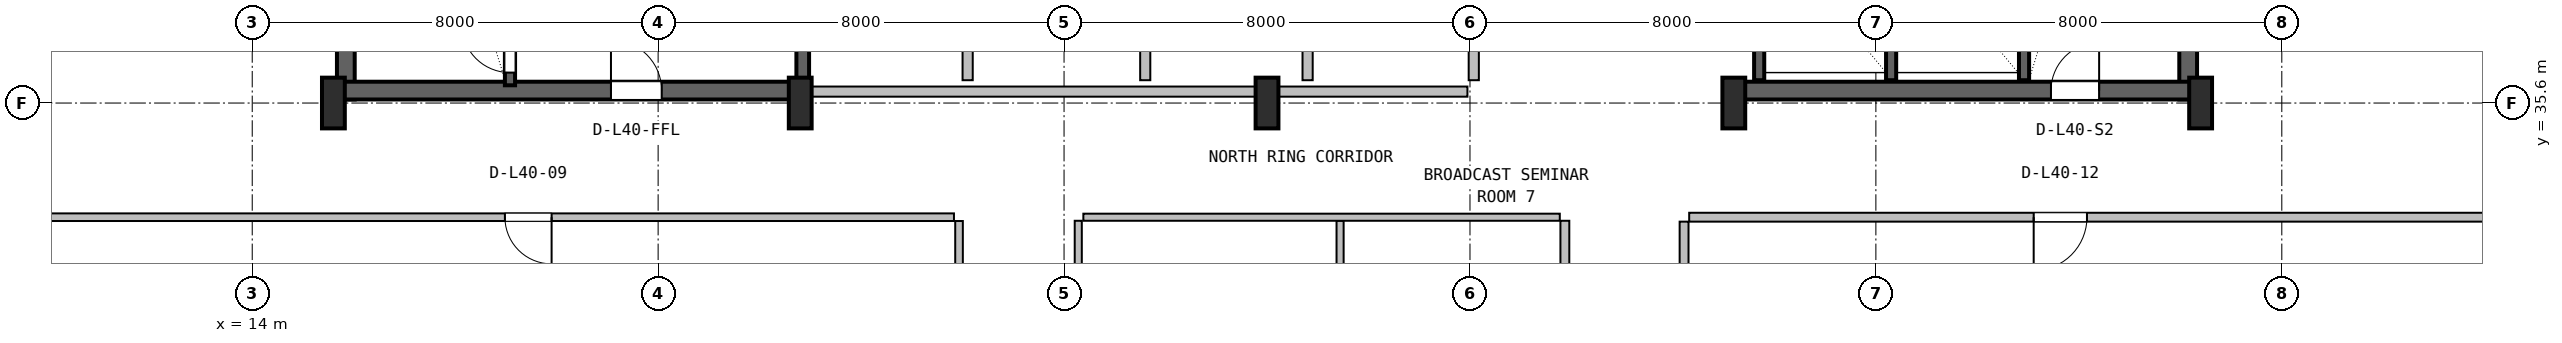
"""IFC4 building model, lengths in metres.
Left out: names, types, materials, properties, quantities, classifications, styles, units other than length and angle.
Written with IfcOpenShell. Run it as: python <this file> out.ifc"""

import sys

from ifc_helpers import new_model, si_unit, direction, frame, frame_2d, origin, origin_2d, place, context, subcontext, project, spatial, rectangle, i_section, extrude, source, transform, mapped, element, fill, save


model = new_model("IFC4")
c1 = context("Model", 3, precision=1e-05, world=origin(), true_north=direction((0.0, 1.0)))
c2 = subcontext(c1, "Body", "Model", "MODEL_VIEW")
j1 = project(units=[si_unit("LENGTHUNIT", "METRE"), si_unit("PLANEANGLEUNIT", "RADIAN")], contexts=[c1])
p1 = place(None, origin())
s1 = spatial("IfcSite", under=j1, at=p1, CompositionType="ELEMENT")
p2 = place(p1, origin())
s2 = spatial("IfcBuilding", under=s1, at=p2, CompositionType="ELEMENT")
p3 = place(p2, frame((0.0, 0.0, 164.8)))
s3 = spatial("IfcBuildingStorey", under=s2, at=p3, CompositionType="ELEMENT", Elevation=164.8)
for number, where, z_axis, x_axis in (
    (1, (15.845, 35.67, 0.0), (0.0, 0.0, 1.0), (0.0, 1.0, 0.0)),
    (2, (52.155, 35.67, 0.0), (0.0, 0.0, 1.0), (0.0, 1.0, 0.0)),
):
    element("IfcWall", number, at=place(p3, frame(where, z_axis=z_axis, x_axis=x_axis)), inside=s3, PredefinedType="SHEAR", context=c2, shape_type="SweptSolid", body=[
        extrude(rectangle(XDim=11.13, YDim=0.35, at=frame_2d((5.565, 0.0))), origin(), (0.0, 0.0, 1.0), 3.55),
    ])
p4 = place(p3, frame((15.67, 35.845, 0.0), z_axis=(0.0, 0.0, 1.0), x_axis=(1.0, 0.0, 0.0)))
e3 = element("IfcWall", 3, at=p4, inside=s3, PredefinedType="SHEAR", context=c2, shape_type="SweptSolid", body=[
    extrude(rectangle(XDim=9.13, YDim=0.35, at=frame_2d((4.565, 0.0))), origin(), (0.0, 0.0, 1.0), 3.55),
])
p5 = place(p4, frame((5.4, 0.0, 0.0)))
e4 = element("IfcOpeningElement", 4, at=p5, cuts=e3, PredefinedType="OPENING", context=c2, shape_type="SweptSolid", body=[
    extrude(rectangle(XDim=1.0, YDim=2.1, at=frame_2d((0.5, 1.05))), frame((0.0, 0.185, 0.0), z_axis=(0.0, -1.0, 0.0), x_axis=(1.0, 0.0, 0.0)), (0.0, 0.0, 1.0), 0.37),
])
p6 = place(p3, frame((43.2, 35.845, 0.0), z_axis=(0.0, 0.0, 1.0), x_axis=(1.0, 0.0, 0.0)))
e5 = element("IfcWall", 5, at=p6, inside=s3, PredefinedType="SHEAR", context=c2, shape_type="SweptSolid", body=[
    extrude(rectangle(XDim=9.13, YDim=0.35, at=frame_2d((4.565, 0.0))), origin(), (0.0, 0.0, 1.0), 3.55),
])
p7 = place(p6, frame((6.25, 0.0, 0.0)))
e6 = element("IfcOpeningElement", 6, at=p7, cuts=e5, PredefinedType="OPENING", context=c2, shape_type="SweptSolid", body=[
    extrude(rectangle(XDim=0.95, YDim=2.1, at=frame_2d((0.475, 1.05))), frame((0.0, 0.185, 0.0), z_axis=(0.0, -1.0, 0.0), x_axis=(1.0, 0.0, 0.0)), (0.0, 0.0, 1.0), 0.37),
])
m1 = source(origin(), c2, "Body", "SweptSolid", [
    extrude(i_section(OverallWidth=0.45, OverallDepth=1.0, WebThickness=0.016, FlangeThickness=0.03, FilletRadius=0.016, at=origin_2d()), origin(), (0.0, 0.0, 1.0), 3.8),
])
for number, where, z_axis, x_axis in (
    (7, (15.6, 35.6, 0.0), (0.0, 0.0, 1.0), (1.0, 0.0, 0.0)),
    (8, (24.8, 35.6, 0.0), (0.0, 0.0, 1.0), (1.0, 0.0, 0.0)),
    (9, (34.0, 35.6, 0.0), (0.0, 0.0, 1.0), (1.0, 0.0, 0.0)),
    (10, (43.2, 35.6, 0.0), (0.0, 0.0, 1.0), (1.0, 0.0, 0.0)),
    (11, (52.4, 35.6, 0.0), (0.0, 0.0, 1.0), (1.0, 0.0, 0.0)),
):
    element("IfcColumn", number, at=place(p3, frame(where, z_axis=z_axis, x_axis=x_axis)), inside=s3, PredefinedType="COLUMN", context=c2, shape_type="MappedRepresentation", body=[
        mapped(m1, transform((0.0, 0.0, 0.0), x_axis=(1.0, 0.0, 0.0), y_axis=(0.0, 1.0, 0.0), z_axis=(0.0, 0.0, 1.0), scale=1.0)),
    ])
p8 = place(p3, frame((19.08, 35.95, 0.0), z_axis=(0.0, 0.0, 1.0), x_axis=(0.0, 1.0, 0.0)))
e12 = element("IfcWall", 12, at=p8, inside=s3, PredefinedType="SHEAR", context=c2, shape_type="SweptSolid", body=[
    extrude(rectangle(XDim=9.65, YDim=0.2, at=frame_2d((4.825, 0.0))), origin(), (0.0, 0.0, 1.0), 3.55),
])
p9 = place(p8, frame((0.25, 0.0, 0.0)))
e13 = element("IfcOpeningElement", 13, at=p9, cuts=e12, PredefinedType="OPENING", context=c2, shape_type="SweptSolid", body=[
    extrude(rectangle(XDim=0.95, YDim=2.1, at=frame_2d((0.475, 1.05))), frame((0.0, 0.11, 0.0), z_axis=(0.0, -1.0, 0.0), x_axis=(1.0, 0.0, 0.0)), (0.0, 0.0, 1.0), 0.22),
])
p10 = place(p3, frame((24.85, 36.05, 0.0), z_axis=(0.0, 0.0, 1.0), x_axis=(0.0, 1.0, 0.0)))
e14 = element("IfcWall", 14, at=p10, inside=s3, PredefinedType="SHEAR", context=c2, shape_type="SweptSolid", body=[
    extrude(rectangle(XDim=10.45, YDim=0.25, at=frame_2d((5.225, 0.0))), origin(), (0.0, 0.0, 1.0), 3.55),
])
p11 = place(p3, frame((48.92, 36.05, 0.0), z_axis=(0.0, 0.0, 1.0), x_axis=(0.0, 1.0, 0.0)))
e15 = element("IfcWall", 15, at=p11, inside=s3, PredefinedType="SHEAR", context=c2, shape_type="SweptSolid", body=[
    extrude(rectangle(XDim=10.5, YDim=0.2, at=frame_2d((5.25, 0.0))), origin(), (0.0, 0.0, 1.0), 3.55),
])
for number, where, z_axis, x_axis in (
    (16, (43.7, 36.05, 0.0), (0.0, 0.0, 1.0), (0.0, 1.0, 0.0)),
    (17, (46.3, 36.05, 0.0), (0.0, 0.0, 1.0), (0.0, 1.0, 0.0)),
):
    element("IfcWall", number, at=place(p3, frame(where, z_axis=z_axis, x_axis=x_axis)), inside=s3, PredefinedType="SHEAR", context=c2, shape_type="SweptSolid", body=[
        extrude(rectangle(XDim=3.05, YDim=0.2, at=frame_2d((1.525, 0.0))), origin(), (0.0, 0.0, 1.0), 3.55),
    ])
p12 = place(p3, frame((25.0, 35.825, 0.0), z_axis=(0.0, 0.0, 1.0), x_axis=(1.0, 0.0, 0.0)))
e18 = element("IfcWall", 18, at=p12, inside=s3, PredefinedType="SOLIDWALL", context=c2, shape_type="SweptSolid", body=[
    extrude(rectangle(XDim=12.95, YDim=0.2, at=frame_2d((6.475, 0.0))), origin(), (0.0, 0.0, 1.0), 2.575),
])
for number, where, z_axis, x_axis in (
    (19, (28.1, 36.05, 0.0), (0.0, 0.0, 1.0), (0.0, 1.0, 0.0)),
    (20, (31.6, 36.05, 0.0), (0.0, 0.0, 1.0), (0.0, 1.0, 0.0)),
):
    element("IfcWall", number, at=place(p3, frame(where, z_axis=z_axis, x_axis=x_axis)), inside=s3, PredefinedType="PLUMBINGWALL", context=c2, shape_type="SweptSolid", body=[
        extrude(rectangle(XDim=3.1, YDim=0.2, at=frame_2d((1.55, 0.0))), origin(), (0.0, 0.0, 1.0), 3.53),
    ])
for number, where, z_axis, x_axis in (
    (21, (34.8, 36.05, 0.0), (0.0, 0.0, 1.0), (0.0, 1.0, 0.0)),
    (22, (38.075, 36.05, 0.0), (0.0, 0.0, 1.0), (0.0, 1.0, 0.0)),
):
    element("IfcWall", number, at=place(p3, frame(where, z_axis=z_axis, x_axis=x_axis)), inside=s3, PredefinedType="SOLIDWALL", context=c2, shape_type="SweptSolid", body=[
        extrude(rectangle(XDim=3.1, YDim=0.2, at=frame_2d((1.55, 0.0))), origin(), (0.0, 0.0, 1.0), 3.53),
    ])
p13 = place(p3, frame((27.93, 26.647, 0.0), z_axis=(0.0, 0.0, 1.0), x_axis=(0.0, 1.0, 0.0)))
e23 = element("IfcWall", 23, at=p13, inside=s3, PredefinedType="PARTITIONING", context=c2, shape_type="SweptSolid", body=[
    extrude(rectangle(XDim=6.628, YDim=0.15, at=frame_2d((3.314, 0.0))), origin(), (0.0, 0.0, 1.0), 3.222),
])
p14 = place(p3, frame((7.18, 33.35, 0.0), z_axis=(0.0, 0.0, 1.0), x_axis=(1.0, 0.0, 0.0)))
e24 = element("IfcWall", 24, at=p14, inside=s3, PredefinedType="PARTITIONING", context=c2, shape_type="SweptSolid", body=[
    extrude(rectangle(XDim=20.65, YDim=0.15, at=frame_2d((10.325, 0.0))), origin(), (0.0, 0.0, 1.0), 2.909),
])
p15 = place(p14, frame((11.8, 0.0, 0.0)))
e25 = element("IfcOpeningElement", 25, at=p15, cuts=e24, PredefinedType="OPENING", context=c2, shape_type="SweptSolid", body=[
    extrude(rectangle(XDim=0.92, YDim=2.08, at=frame_2d((0.46, 1.04))), frame((0.0, 0.085, 0.0), z_axis=(0.0, -1.0, 0.0), x_axis=(1.0, 0.0, 0.0)), (0.0, 0.0, 1.0), 0.17),
])
p16 = place(p3, frame((35.44, 28.98, 0.0), z_axis=(0.0, 0.0, 1.0), x_axis=(0.0, 1.0, 0.0)))
e26 = element("IfcWall", 26, at=p16, inside=s3, PredefinedType="PARTITIONING", context=c2, shape_type="SweptSolid", body=[
    extrude(rectangle(XDim=4.3, YDim=0.14, at=frame_2d((2.15, 0.0))), origin(), (0.0, 0.0, 1.0), 3.222),
])
p17 = place(p3, frame((30.38, 33.35, 0.0), z_axis=(0.0, 0.0, 1.0), x_axis=(1.0, 0.0, 0.0)))
e27 = element("IfcWall", 27, at=p17, inside=s3, PredefinedType="PARTITIONING", context=c2, shape_type="SweptSolid", body=[
    extrude(rectangle(XDim=9.39, YDim=0.14, at=frame_2d((4.695, 0.0))), origin(), (0.0, 0.0, 1.0), 2.909),
])
p18 = place(p3, frame((30.28, 28.98, 0.0), z_axis=(0.0, 0.0, 1.0), x_axis=(0.0, 1.0, 0.0)))
e28 = element("IfcWall", 28, at=p18, inside=s3, PredefinedType="PARTITIONING", context=c2, shape_type="SweptSolid", body=[
    extrude(rectangle(XDim=4.3, YDim=0.14, at=frame_2d((2.15, 0.0))), origin(), (0.0, 0.0, 1.0), 3.222),
])
p19 = place(p3, frame((39.87, 28.98, 0.0), z_axis=(0.0, 0.0, 1.0), x_axis=(0.0, 1.0, 0.0)))
e29 = element("IfcWall", 29, at=p19, inside=s3, PredefinedType="PARTITIONING", context=c2, shape_type="SweptSolid", body=[
    extrude(rectangle(XDim=4.3, YDim=0.175, at=frame_2d((2.15, 0.0))), origin(), (0.0, 0.0, 1.0), 3.222),
])
p20 = place(p19, frame((1.625, 0.0, 0.0)))
e30 = element("IfcOpeningElement", 30, at=p20, cuts=e29, PredefinedType="OPENING", context=c2, shape_type="SweptSolid", body=[
    extrude(rectangle(XDim=1.05, YDim=2.1, at=frame_2d((0.525, 1.05))), frame((0.0, 0.098, 0.0), z_axis=(0.0, -1.0, 0.0), x_axis=(1.0, 0.0, 0.0)), (0.0, 0.0, 1.0), 0.195),
])
p21 = place(p3, frame((42.32, 33.35, 0.0), z_axis=(0.0, 0.0, 1.0), x_axis=(1.0, 0.0, 0.0)))
e31 = element("IfcWall", 31, at=p21, inside=s3, PredefinedType="PARTITIONING", context=c2, shape_type="SweptSolid", body=[
    extrude(rectangle(XDim=18.5, YDim=0.175, at=frame_2d((9.25, 0.0))), origin(), (0.0, 0.0, 1.0), 2.909),
])
p22 = place(p21, frame((6.79, 0.0, 0.0)))
e32 = element("IfcOpeningElement", 32, at=p22, cuts=e31, PredefinedType="OPENING", context=c2, shape_type="SweptSolid", body=[
    extrude(rectangle(XDim=1.05, YDim=2.1, at=frame_2d((0.525, 1.05))), frame((0.0, 0.098, 0.0), z_axis=(0.0, -1.0, 0.0), x_axis=(1.0, 0.0, 0.0)), (0.0, 0.0, 1.0), 0.195),
])
p23 = place(p3, frame((42.22, 26.647, 0.0), z_axis=(0.0, 0.0, 1.0), x_axis=(0.0, 1.0, 0.0)))
e33 = element("IfcWall", 33, at=p23, inside=s3, PredefinedType="PARTITIONING", context=c2, shape_type="SweptSolid", body=[
    extrude(rectangle(XDim=6.616, YDim=0.175, at=frame_2d((3.308, 0.0))), origin(), (0.0, 0.0, 1.0), 3.222),
])
m2 = source(origin(), c2, "Body", "SweptSolid", [
    extrude(rectangle(XDim=0.95, YDim=2.1, at=frame_2d((0.475, 1.05))), frame((0.0, 0.025, 0.0), z_axis=(0.0, -1.0, 0.0), x_axis=(1.0, 0.0, 0.0)), (0.0, 0.0, 1.0), 0.05),
])
p24 = place(p9, origin())
e34 = element("IfcDoor", 34, at=p24, inside=s3, OperationType="SINGLE_SWING_RIGHT", PredefinedType="DOOR", context=c2, shape_type="MappedRepresentation", body=[
    mapped(m2, transform((0.0, 0.0, 0.0), x_axis=(1.0, 0.0, 0.0), y_axis=(0.0, 1.0, 0.0), z_axis=(0.0, 0.0, 1.0), scale=1.0)),
])
fill(e13, e34)
m3 = source(origin(), c2, "Body", "SweptSolid", [
    extrude(rectangle(XDim=1.0, YDim=2.1, at=frame_2d((0.5, 1.05))), frame((0.0, 0.025, 0.0), z_axis=(0.0, -1.0, 0.0), x_axis=(1.0, 0.0, 0.0)), (0.0, 0.0, 1.0), 0.05),
])
p25 = place(p5, origin())
e35 = element("IfcDoor", 35, at=p25, inside=s3, OperationType="SINGLE_SWING_LEFT", PredefinedType="DOOR", context=c2, shape_type="MappedRepresentation", body=[
    mapped(m3, transform((0.0, 0.0, 0.0), x_axis=(1.0, 0.0, 0.0), y_axis=(0.0, 1.0, 0.0), z_axis=(0.0, 0.0, 1.0), scale=1.0)),
])
fill(e4, e35)
p26 = place(p7, origin())
e36 = element("IfcDoor", 36, at=p26, inside=s3, OperationType="SINGLE_SWING_RIGHT", PredefinedType="DOOR", context=c2, shape_type="MappedRepresentation", body=[
    mapped(m2, transform((0.0, 0.0, 0.0), x_axis=(1.0, 0.0, 0.0), y_axis=(0.0, 1.0, 0.0), z_axis=(0.0, 0.0, 1.0), scale=1.0)),
])
fill(e6, e36)
m4 = source(origin(), c2, "Body", "SweptSolid", [
    extrude(rectangle(XDim=0.92, YDim=2.08, at=frame_2d((0.46, 1.04))), frame((0.0, 0.025, 0.0), z_axis=(0.0, -1.0, 0.0), x_axis=(1.0, 0.0, 0.0)), (0.0, 0.0, 1.0), 0.05),
])
p27 = place(p15, frame((0.92, 0.0, 0.0), z_axis=(0.0, 0.0, 1.0), x_axis=(-1.0, 0.0, 0.0)))
e37 = element("IfcDoor", 37, at=p27, inside=s3, OperationType="SINGLE_SWING_RIGHT", PredefinedType="DOOR", context=c2, shape_type="MappedRepresentation", body=[
    mapped(m4, transform((0.0, 0.0, 0.0), x_axis=(1.0, 0.0, 0.0), y_axis=(0.0, 1.0, 0.0), z_axis=(0.0, 0.0, 1.0), scale=1.0)),
])
fill(e25, e37)
m5 = source(origin(), c2, "Body", "SweptSolid", [
    extrude(rectangle(XDim=1.05, YDim=2.1, at=frame_2d((0.525, 1.05))), frame((0.0, 0.025, 0.0), z_axis=(0.0, -1.0, 0.0), x_axis=(1.0, 0.0, 0.0)), (0.0, 0.0, 1.0), 0.05),
])
p28 = place(p22, frame((1.05, 0.0, 0.0), z_axis=(0.0, 0.0, 1.0), x_axis=(-1.0, 0.0, 0.0)))
e38 = element("IfcDoor", 38, at=p28, inside=s3, OperationType="SINGLE_SWING_LEFT", PredefinedType="DOOR", context=c2, shape_type="MappedRepresentation", body=[
    mapped(m5, transform((0.0, 0.0, 0.0), x_axis=(1.0, 0.0, 0.0), y_axis=(0.0, 1.0, 0.0), z_axis=(0.0, 0.0, 1.0), scale=1.0)),
])
fill(e32, e38)
save(model, sys.argv[1])
